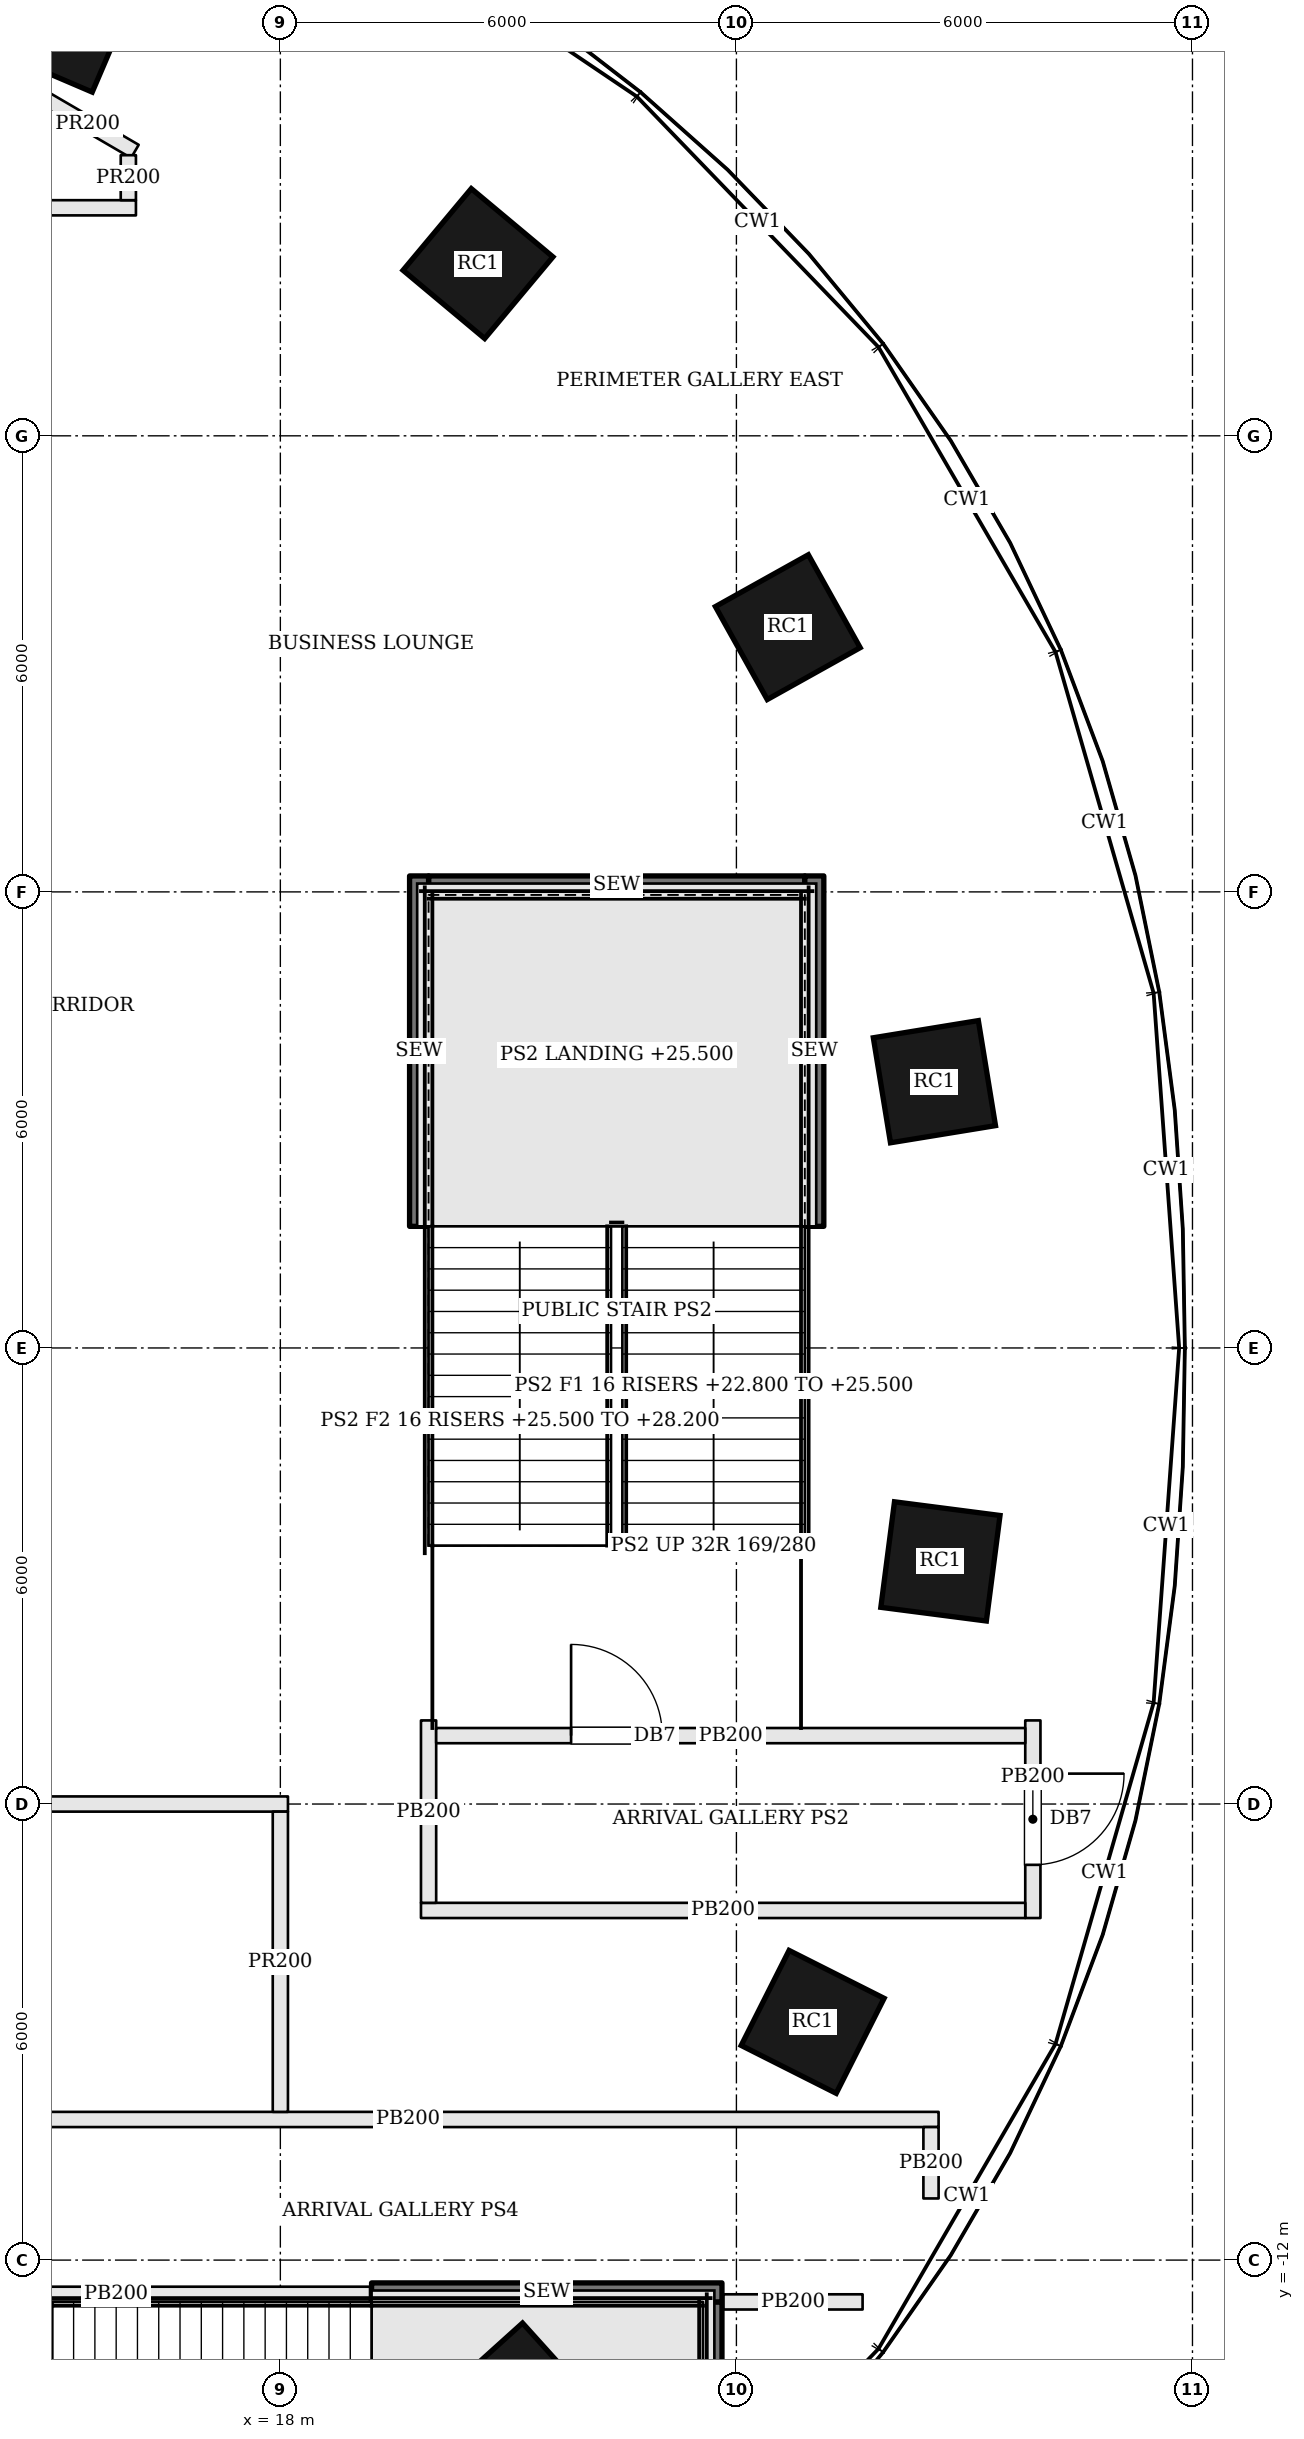
"""IFC4 building model, lengths in metres.
Left out: names, types, materials, properties, quantities, classifications, styles, units other than length and angle.
Written with IfcOpenShell. Run it as: python <this file> out.ifc"""

import sys

from ifc_helpers import new_model, si_unit, direction, frame, frame_2d, origin, origin_2d, place, context, subcontext, project, spatial, rectangle, extrude, element, fill, save


model = new_model("IFC4")
c1 = context("Model", 3, precision=1e-05, world=origin(), true_north=direction((0.0, 1.0)))
c2 = subcontext(c1, "Body", "Model", "MODEL_VIEW")
j1 = project(units=[si_unit("LENGTHUNIT", "METRE"), si_unit("PLANEANGLEUNIT", "RADIAN")], contexts=[c1])
p1 = place(None, origin())
s1 = spatial("IfcSite", under=j1, at=p1, CompositionType="ELEMENT")
p2 = place(p1, origin())
s2 = spatial("IfcBuilding", under=s1, at=p2, CompositionType="ELEMENT")
p3 = place(p2, frame((0.0, 0.0, 22.8)))
s3 = spatial("IfcBuildingStorey", under=s2, at=p3, CompositionType="ELEMENT", Elevation=22.8)
for number, where, z_axis, x_axis in (
    (1, (26.605, 3.503, 0.0), (0.0, 0.0, 1.0), (-0.161, 0.987, 0.0)),
    (2, (24.676, 9.483, 0.0), (0.0, 0.0, 1.0), (-0.487, 0.873, 0.0)),
    (3, (20.6, 14.266, 0.0), (0.0, 0.0, 1.0), (-0.767, 0.641, 0.0)),
    (4, (15.157, 17.441, 0.0), (0.0, 0.0, 1.0), (-0.919, 0.394, 0.0)),
    (5, (21.135, -13.817, 0.0), (0.0, 0.0, 1.0), (0.743, 0.67, 0.0)),
    (6, (25.003, -8.866, 0.0), (0.0, 0.0, 1.0), (0.45, 0.893, 0.0)),
    (7, (26.684, -2.808, 0.0), (0.0, 0.0, 1.0), (0.128, 0.992, 0.0)),
):
    element("IfcColumn", number, at=place(p3, frame(where, z_axis=z_axis, x_axis=x_axis)), inside=s3, PredefinedType="COLUMN", context=c2, shape_type="SweptSolid", body=[
        extrude(rectangle(XDim=1.4, YDim=1.4, at=origin_2d()), origin(), (0.0, 0.0, 1.0), 5.4),
    ])
p4 = place(p3, frame((27.9, -4.9, 0.0), z_axis=(0.0, 0.0, 1.0), x_axis=(0.0, -1.0, 0.0)))
e8 = element("IfcWall", 8, at=p4, inside=s3, PredefinedType="PARTITIONING", context=c2, shape_type="SweptSolid", body=[
    extrude(rectangle(XDim=2.6, YDim=0.2, at=frame_2d((1.3, 0.0))), origin(), (0.0, 0.0, 1.0), 4.43),
])
p5 = place(p4, frame((0.7, 0.0, 0.0)))
e9 = element("IfcOpeningElement", 9, at=p5, cuts=e8, PredefinedType="OPENING", context=c2, shape_type="SweptSolid", body=[
    extrude(rectangle(XDim=1.2, YDim=2.1, at=frame_2d((0.6, 1.05))), frame((0.0, 0.11, 0.0), z_axis=(0.0, -1.0, 0.0), x_axis=(1.0, 0.0, 0.0)), (0.0, 0.0, 1.0), 0.22),
])
p6 = place(p3, frame((27.8, -7.4, 0.0), z_axis=(0.0, 0.0, 1.0), x_axis=(-1.0, 0.0, 0.0)))
e10 = element("IfcWall", 10, at=p6, inside=s3, PredefinedType="PARTITIONING", context=c2, shape_type="SweptSolid", body=[
    extrude(rectangle(XDim=7.95, YDim=0.2, at=frame_2d((3.975, 0.0))), origin(), (0.0, 0.0, 1.0), 4.43),
])
p7 = place(p3, frame((19.95, -7.3, 0.0), z_axis=(0.0, 0.0, 1.0), x_axis=(0.0, 1.0, 0.0)))
e11 = element("IfcWall", 11, at=p7, inside=s3, PredefinedType="PARTITIONING", context=c2, shape_type="SweptSolid", body=[
    extrude(rectangle(XDim=2.4, YDim=0.2, at=frame_2d((1.2, 0.0))), origin(), (0.0, 0.0, 1.0), 4.43),
])
p8 = place(p3, frame((20.05, -5.1, 0.0), z_axis=(0.0, 0.0, 1.0), x_axis=(1.0, 0.0, 0.0)))
e12 = element("IfcWall", 12, at=p8, inside=s3, PredefinedType="PARTITIONING", context=c2, shape_type="SweptSolid", body=[
    extrude(rectangle(XDim=7.75, YDim=0.2, at=frame_2d((3.875, 0.0))), origin(), (0.0, 0.0, 1.0), 4.43),
])
p9 = place(p8, frame((1.775, 0.0, 0.0)))
e13 = element("IfcOpeningElement", 13, at=p9, cuts=e12, PredefinedType="OPENING", context=c2, shape_type="SweptSolid", body=[
    extrude(rectangle(XDim=1.2, YDim=2.1, at=frame_2d((0.6, 1.05))), frame((0.0, 0.11, 0.0), z_axis=(0.0, -1.0, 0.0), x_axis=(1.0, 0.0, 0.0)), (0.0, 0.0, 1.0), 0.22),
])
p10 = place(p3, frame((25.66, -12.55, 0.0), z_axis=(0.0, 0.0, 1.0), x_axis=(-1.0, 0.0, 0.0)))
e14 = element("IfcWall", 14, at=p10, inside=s3, PredefinedType="PARTITIONING", context=c2, shape_type="SweptSolid", body=[
    extrude(rectangle(XDim=1.83, YDim=0.2, at=frame_2d((0.915, 0.0))), origin(), (0.0, 0.0, 1.0), 4.43),
])
p11 = place(p3, frame((19.18, -12.45, 0.0), z_axis=(0.0, 0.0, 1.0), x_axis=(-1.0, 0.0, 0.0)))
e15 = element("IfcWall", 15, at=p11, inside=s3, PredefinedType="PARTITIONING", context=c2, shape_type="SweptSolid", body=[
    extrude(rectangle(XDim=6.68, YDim=0.2, at=frame_2d((3.34, 0.0))), origin(), (0.0, 0.0, 1.0), 4.43),
])
p12 = place(p11, frame((4.78, 0.0, 0.0)))
e16 = element("IfcOpeningElement", 16, at=p12, cuts=e15, PredefinedType="OPENING", context=c2, shape_type="SweptSolid", body=[
    extrude(rectangle(XDim=1.2, YDim=2.1, at=frame_2d((0.6, 1.05))), frame((0.0, 0.11, 0.0), z_axis=(0.0, -1.0, 0.0), x_axis=(1.0, 0.0, 0.0)), (0.0, 0.0, 1.0), 0.22),
])
p13 = place(p3, frame((12.7, -10.15, 0.0), z_axis=(0.0, 0.0, 1.0), x_axis=(1.0, 0.0, 0.0)))
e17 = element("IfcWall", 17, at=p13, inside=s3, PredefinedType="PARTITIONING", context=c2, shape_type="SweptSolid", body=[
    extrude(rectangle(XDim=13.96, YDim=0.2, at=frame_2d((6.98, 0.0))), origin(), (0.0, 0.0, 1.0), 4.43),
])
p14 = place(p3, frame((26.56, -10.25, 0.0), z_axis=(0.0, 0.0, 1.0), x_axis=(0.0, -1.0, 0.0)))
e18 = element("IfcWall", 18, at=p14, inside=s3, PredefinedType="PARTITIONING", context=c2, shape_type="SweptSolid", body=[
    extrude(rectangle(XDim=0.939, YDim=0.2, at=frame_2d((0.469, 0.0))), origin(), (0.0, 0.0, 1.0), 4.43),
])
p15 = place(p3, frame((16.1, 15.0, 0.0), z_axis=(0.0, 0.0, 1.0), x_axis=(-1.0, 0.0, 0.0)))
e19 = element("IfcWall", 19, at=p15, inside=s3, PredefinedType="PARTITIONING", context=c2, shape_type="SweptSolid", body=[
    extrude(rectangle(XDim=24.228, YDim=0.2, at=frame_2d((12.114, 0.0))), origin(), (0.0, 0.0, 1.0), 4.43),
])
p16 = place(p15, frame((22.328, 0.0, 0.0)))
e20 = element("IfcOpeningElement", 20, at=p16, cuts=e19, PredefinedType="OPENING", context=c2, shape_type="SweptSolid", body=[
    extrude(rectangle(XDim=1.2, YDim=2.1, at=frame_2d((0.6, 1.05))), frame((0.0, 0.11, 0.0), z_axis=(0.0, -1.0, 0.0), x_axis=(1.0, 0.0, 0.0)), (0.0, 0.0, 1.0), 0.22),
])
p17 = place(p15, frame((18.414, 0.0, 0.0)))
e21 = element("IfcOpeningElement", 21, at=p17, cuts=e19, PredefinedType="OPENING", context=c2, shape_type="SweptSolid", body=[
    extrude(rectangle(XDim=1.0, YDim=2.1, at=frame_2d((0.5, 1.05))), frame((0.0, 0.11, 0.0), z_axis=(0.0, -1.0, 0.0), x_axis=(1.0, 0.0, 0.0)), (0.0, 0.0, 1.0), 0.22),
])
p18 = place(p15, frame((7.6, 0.0, 0.0)))
e22 = element("IfcOpeningElement", 22, at=p18, cuts=e19, PredefinedType="OPENING", context=c2, shape_type="SweptSolid", body=[
    extrude(rectangle(XDim=1.0, YDim=2.1, at=frame_2d((0.5, 1.05))), frame((0.0, 0.11, 0.0), z_axis=(0.0, -1.0, 0.0), x_axis=(1.0, 0.0, 0.0)), (0.0, 0.0, 1.0), 0.22),
])
p19 = place(p3, frame((-7.378, -6.0, 0.0), z_axis=(0.0, 0.0, 1.0), x_axis=(1.0, 0.0, 0.0)))
e23 = element("IfcWall", 23, at=p19, inside=s3, PredefinedType="PARTITIONING", context=c2, shape_type="SweptSolid", body=[
    extrude(rectangle(XDim=25.478, YDim=0.2, at=frame_2d((12.739, 0.0))), origin(), (0.0, 0.0, 1.0), 4.43),
])
p20 = place(p19, frame((0.7, 0.0, 0.0)))
e24 = element("IfcOpeningElement", 24, at=p20, cuts=e23, PredefinedType="OPENING", context=c2, shape_type="SweptSolid", body=[
    extrude(rectangle(XDim=1.2, YDim=2.1, at=frame_2d((0.6, 1.05))), frame((0.0, 0.11, 0.0), z_axis=(0.0, -1.0, 0.0), x_axis=(1.0, 0.0, 0.0)), (0.0, 0.0, 1.0), 0.22),
])
p21 = place(p19, frame((4.439, 0.0, 0.0)))
e25 = element("IfcOpeningElement", 25, at=p21, cuts=e23, PredefinedType="OPENING", context=c2, shape_type="SweptSolid", body=[
    extrude(rectangle(XDim=1.0, YDim=2.1, at=frame_2d((0.5, 1.05))), frame((0.0, 0.11, 0.0), z_axis=(0.0, -1.0, 0.0), x_axis=(1.0, 0.0, 0.0)), (0.0, 0.0, 1.0), 0.22),
])
p22 = place(p19, frame((11.378, 0.0, 0.0)))
e26 = element("IfcOpeningElement", 26, at=p22, cuts=e23, PredefinedType="OPENING", context=c2, shape_type="SweptSolid", body=[
    extrude(rectangle(XDim=1.0, YDim=2.1, at=frame_2d((0.5, 1.05))), frame((0.0, 0.11, 0.0), z_axis=(0.0, -1.0, 0.0), x_axis=(1.0, 0.0, 0.0)), (0.0, 0.0, 1.0), 0.22),
])
p23 = place(p19, frame((19.378, 0.0, 0.0)))
e27 = element("IfcOpeningElement", 27, at=p23, cuts=e23, PredefinedType="OPENING", context=c2, shape_type="SweptSolid", body=[
    extrude(rectangle(XDim=1.0, YDim=2.1, at=frame_2d((0.5, 1.05))), frame((0.0, 0.11, 0.0), z_axis=(0.0, -1.0, 0.0), x_axis=(1.0, 0.0, 0.0)), (0.0, 0.0, 1.0), 0.22),
])
p24 = place(p3, frame((14.846, 16.465, 0.0), z_axis=(0.0, 0.0, 1.0), x_axis=(0.863834413875, -0.503775848375, 0.0)))
e28 = element("IfcWall", 28, at=p24, inside=s3, PredefinedType="PARTITIONING", context=c2, shape_type="SweptSolid", body=[
    extrude(rectangle(XDim=1.436, YDim=0.2, at=frame_2d((0.718, 0.0))), origin(), (0.0, 0.0, 1.0), 4.43),
])
p25 = place(p3, frame((16.0, 15.692, 0.0), z_axis=(0.0, 0.0, 1.0), x_axis=(0.0, -1.0, 0.0)))
e29 = element("IfcWall", 29, at=p25, inside=s3, PredefinedType="PARTITIONING", context=c2, shape_type="SweptSolid", body=[
    extrude(rectangle(XDim=0.592, YDim=0.2, at=frame_2d((0.296, 0.0))), origin(), (0.0, 0.0, 1.0), 4.43),
])
p26 = place(p3, frame((18.0, -6.1, 0.0), z_axis=(0.0, 0.0, 1.0), x_axis=(0.0, -1.0, 0.0)))
e30 = element("IfcWall", 30, at=p26, inside=s3, PredefinedType="PARTITIONING", context=c2, shape_type="SweptSolid", body=[
    extrude(rectangle(XDim=3.95, YDim=0.2, at=frame_2d((1.975, 0.0))), origin(), (0.0, 0.0, 1.0), 4.43),
])
p27 = place(p3, frame((24.9, 6.085, 0.0), z_axis=(0.0, 0.0, 1.0), x_axis=(-1.0, 0.0, 0.0)))
e31 = element("IfcWall", 31, at=p27, inside=s3, PredefinedType="SOLIDWALL", context=c2, shape_type="SweptSolid", body=[
    extrude(rectangle(XDim=4.95, YDim=0.25, at=frame_2d((2.475, 0.0))), origin(), (0.0, 0.0, 1.0), 5.15),
])
for number, where, z_axis, x_axis in (
    (32, (19.825, 1.6, 0.0), (0.0, 0.0, 1.0), (0.0, 1.0, 0.0)),
    (33, (25.025, 1.6, 0.0), (0.0, 0.0, 1.0), (0.0, 1.0, 0.0)),
):
    element("IfcWall", number, at=place(p3, frame(where, z_axis=z_axis, x_axis=x_axis)), inside=s3, PredefinedType="SOLIDWALL", context=c2, shape_type="SweptSolid", body=[
        extrude(rectangle(XDim=4.61, YDim=0.25, at=frame_2d((2.305, 0.0))), origin(), (0.0, 0.0, 1.0), 5.15),
    ])
p28 = place(p3, frame((23.685, -17.5, 0.0), z_axis=(0.0, 0.0, 1.0), x_axis=(0.0, 1.0, 0.0)))
e34 = element("IfcWall", 34, at=p28, inside=s3, PredefinedType="SOLIDWALL", context=c2, shape_type="SweptSolid", body=[
    extrude(rectangle(XDim=4.95, YDim=0.25, at=frame_2d((2.475, 0.0))), origin(), (0.0, 0.0, 1.0), 5.15),
])
p29 = place(p3, frame((19.2, -12.425, 0.0), z_axis=(0.0, 0.0, 1.0), x_axis=(1.0, 0.0, 0.0)))
e35 = element("IfcWall", 35, at=p29, inside=s3, PredefinedType="SOLIDWALL", context=c2, shape_type="SweptSolid", body=[
    extrude(rectangle(XDim=4.61, YDim=0.25, at=frame_2d((2.305, 0.0))), origin(), (0.0, 0.0, 1.0), 5.15),
])
p30 = place(p9, origin())
e36 = element("IfcDoor", 36, at=p30, inside=s3, OperationType="SINGLE_SWING_LEFT", PredefinedType="DOOR", context=c2, shape_type="SweptSolid", body=[
    extrude(rectangle(XDim=1.2, YDim=2.1, at=frame_2d((0.6, 1.05))), frame((0.0, 0.025, 0.0), z_axis=(0.0, -1.0, 0.0), x_axis=(1.0, 0.0, 0.0)), (0.0, 0.0, 1.0), 0.05),
])
fill(e13, e36)
p31 = place(p5, origin())
e37 = element("IfcDoor", 37, at=p31, inside=s3, OperationType="SINGLE_SWING_LEFT", PredefinedType="DOOR", context=c2, shape_type="SweptSolid", body=[
    extrude(rectangle(XDim=1.2, YDim=2.1, at=frame_2d((0.6, 1.05))), frame((0.0, 0.025, 0.0), z_axis=(0.0, -1.0, 0.0), x_axis=(1.0, 0.0, 0.0)), (0.0, 0.0, 1.0), 0.05),
])
fill(e9, e37)
save(model, sys.argv[1])
